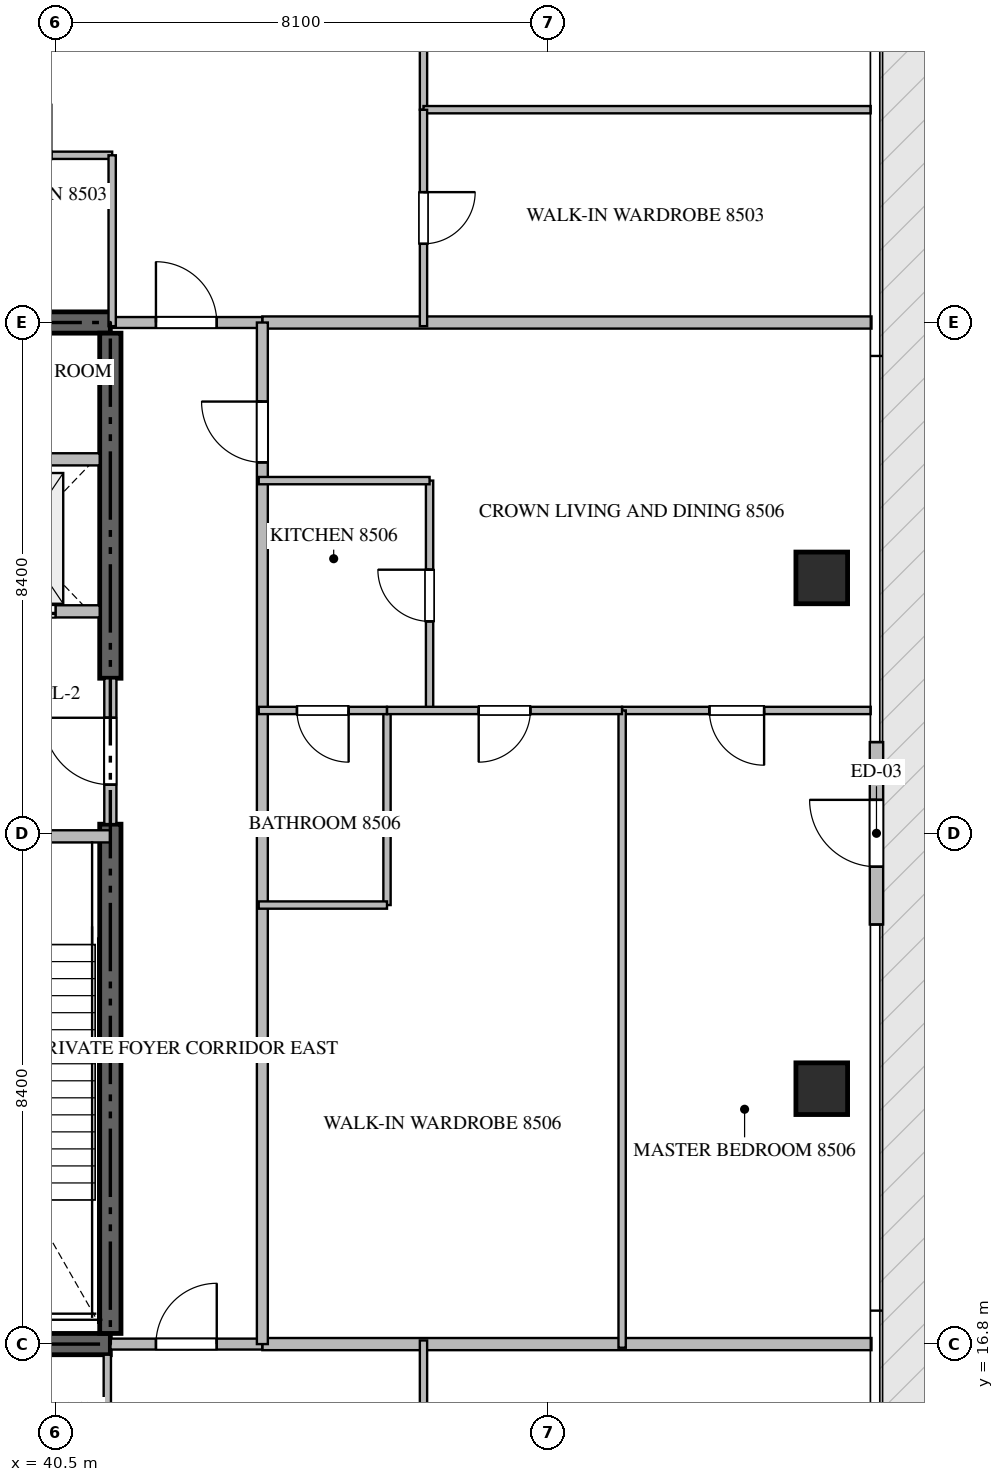
"""IFC4 building model, lengths in metres.
Left out: names, types, materials, properties, quantities, classifications, styles, units other than length and angle.
Written with IfcOpenShell. Run it as: python <this file> out.ifc"""

import sys

from ifc_helpers import new_model, si_unit, direction, frame, frame_2d, origin, origin_2d, place, context, subcontext, project, spatial, rectangle, extrude, source, transform, mapped, element, fill, save


model = new_model("IFC4")
c1 = context("Model", 3, precision=1e-05, world=origin(), true_north=direction((0.0, 1.0)))
c2 = subcontext(c1, "Body", "Model", "MODEL_VIEW")
j1 = project(units=[si_unit("LENGTHUNIT", "METRE"), si_unit("PLANEANGLEUNIT", "RADIAN")], contexts=[c1])
p1 = place(None, origin())
s1 = spatial("IfcSite", under=j1, at=p1, CompositionType="ELEMENT")
p2 = place(p1, origin())
s2 = spatial("IfcBuilding", under=s1, at=p2, CompositionType="ELEMENT")
p3 = place(p2, frame((0.0, 0.0, 342.05)))
s3 = spatial("IfcBuildingStorey", under=s2, at=p3, CompositionType="ELEMENT", Elevation=342.05)
for number, where, z_axis, x_axis in (
    (1, (23.4, 16.8, -0.26), (0.0, 0.0, 1.0), (1.0, 0.0, 0.0)),
    (2, (41.4, 33.6, -0.26), (0.0, 0.0, 1.0), (-1.0, 0.0, 0.0)),
):
    element("IfcWall", number, at=place(p3, frame(where, z_axis=z_axis, x_axis=x_axis)), inside=s3, PredefinedType="SHEAR", context=c2, shape_type="SweptSolid", body=[
        extrude(rectangle(XDim=18.0, YDim=0.35, at=frame_2d((9.0, 0.0))), origin(), (0.0, 0.0, 1.0), 5.898),
    ])
p4 = place(p3, frame((41.4, 16.975, -0.26), z_axis=(0.0, 0.0, 1.0), x_axis=(0.0, 1.0, 0.0)))
e3 = element("IfcWall", 3, at=p4, inside=s3, PredefinedType="SHEAR", context=c2, shape_type="SweptSolid", body=[
    extrude(rectangle(XDim=8.375, YDim=0.35, at=frame_2d((4.188, 0.0))), origin(), (0.0, 0.0, 1.0), 5.898),
])
p5 = place(p3, frame((41.4, 27.75, -0.26), z_axis=(0.0, 0.0, 1.0), x_axis=(0.0, 1.0, 0.0)))
e4 = element("IfcWall", 4, at=p5, inside=s3, PredefinedType="SHEAR", context=c2, shape_type="SweptSolid", body=[
    extrude(rectangle(XDim=5.675, YDim=0.35, at=frame_2d((2.837, 0.0))), origin(), (0.0, 0.0, 1.0), 5.898),
])
m1 = source(origin(), c2, "Body", "SweptSolid", [
    extrude(rectangle(XDim=0.85, YDim=0.85, at=origin_2d()), origin(), (0.0, 0.0, 1.0), 5.9),
])
for number, where, z_axis, x_axis in (
    (5, (53.1, 21.0, -0.26), (0.0, 0.0, 1.0), (1.0, 0.0, 0.0)),
    (6, (53.1, 29.4, -0.26), (0.0, 0.0, 1.0), (1.0, 0.0, 0.0)),
):
    element("IfcColumn", number, at=place(p3, frame(where, z_axis=z_axis, x_axis=x_axis)), inside=s3, PredefinedType="COLUMN", context=c2, shape_type="MappedRepresentation", body=[
        mapped(m1, transform((0.0, 0.0, 0.0), scale=1.0)),
    ])
p6 = place(p3, frame((54.0, 23.7, 0.0), z_axis=(0.0, 0.0, 1.0), x_axis=(0.0, 1.0, 0.0)))
e7 = element("IfcWall", 7, at=p6, inside=s3, PredefinedType="ELEMENTEDWALL", context=c2, shape_type="SweptSolid", body=[
    extrude(rectangle(XDim=3.0, YDim=0.22, at=frame_2d((1.5, 0.0))), origin(), (0.0, 0.0, 1.0), 5.625),
])
p7 = place(p6, frame((0.95, 0.0, 0.0)))
e8 = element("IfcOpeningElement", 8, at=p7, cuts=e7, PredefinedType="OPENING", context=c2, shape_type="SweptSolid", body=[
    extrude(rectangle(XDim=1.1, YDim=2.2, at=frame_2d((0.55, 1.1))), frame((0.0, 0.12, 0.0), z_axis=(0.0, -1.0, 0.0), x_axis=(1.0, 0.0, 0.0)), (0.0, 0.0, 1.0), 0.24),
])
p8 = place(p3, frame((36.95, 25.15, 0.0), z_axis=(0.0, 0.0, 1.0), x_axis=(1.0, 0.0, 0.0)))
e9 = element("IfcWall", 9, at=p8, inside=s3, PredefinedType="STANDARD", context=c2, shape_type="SweptSolid", body=[
    extrude(rectangle(XDim=4.45, YDim=0.2, at=frame_2d((2.225, 0.0))), origin(), (0.0, 0.0, 1.0), 5.64),
])
p9 = place(p8, frame((1.65, 0.0, 0.0)))
e10 = element("IfcOpeningElement", 10, at=p9, cuts=e9, PredefinedType="OPENING", context=c2, shape_type="SweptSolid", body=[
    extrude(rectangle(XDim=1.1, YDim=2.15, at=frame_2d((0.55, 1.075))), frame((0.0, 0.11, 0.0), z_axis=(0.0, -1.0, 0.0), x_axis=(1.0, 0.0, 0.0)), (0.0, 0.0, 1.0), 0.22),
])
p10 = place(p3, frame((38.75, 28.85, 0.0), z_axis=(0.0, 0.0, 1.0), x_axis=(1.0, 0.0, 0.0)))
e11 = element("IfcWall", 11, at=p10, inside=s3, PredefinedType="STANDARD", context=c2, shape_type="SweptSolid", body=[
    extrude(rectangle(XDim=2.475, YDim=0.2, at=frame_2d((1.238, 0.0))), origin(), (0.0, 0.0, 1.0), 5.64),
])
p11 = place(p10, frame((0.55, 0.0, 0.0)))
e12 = element("IfcOpeningElement", 12, at=p11, cuts=e11, PredefinedType="OPENING", context=c2, shape_type="SweptSolid", body=[
    extrude(rectangle(XDim=1.2, YDim=2.2, at=frame_2d((0.6, 1.1))), frame((0.0, 0.11, 0.0), z_axis=(0.0, -1.0, 0.0), x_axis=(1.0, 0.0, 0.0)), (0.0, 0.0, 1.0), 0.22),
])
p12 = place(p3, frame((38.75, 31.35, 0.0), z_axis=(0.0, 0.0, 1.0), x_axis=(1.0, 0.0, 0.0)))
e13 = element("IfcWall", 13, at=p12, inside=s3, PredefinedType="STANDARD", context=c2, shape_type="SweptSolid", body=[
    extrude(rectangle(XDim=2.475, YDim=0.2, at=frame_2d((1.238, 0.0))), origin(), (0.0, 0.0, 1.0), 5.64),
])
p13 = place(p3, frame((41.4, 25.352, 0.0), z_axis=(0.0, 0.0, 1.0), x_axis=(0.0, 1.0, 0.0)))
e14 = element("IfcWall", 14, at=p13, inside=s3, PredefinedType="STANDARD", context=c2, shape_type="SweptSolid", body=[
    extrude(rectangle(XDim=2.396, YDim=0.2, at=frame_2d((1.198, 0.0))), origin(), (0.0, 0.0, 1.0), 5.64),
])
p14 = place(p13, frame((0.648, 0.0, 0.0)))
e15 = element("IfcOpeningElement", 15, at=p14, cuts=e14, PredefinedType="OPENING", context=c2, shape_type="SweptSolid", body=[
    extrude(rectangle(XDim=1.1, YDim=2.15, at=frame_2d((0.55, 1.075))), frame((0.0, 0.11, 0.0), z_axis=(0.0, -1.0, 0.0), x_axis=(1.0, 0.0, 0.0)), (0.0, 0.0, 1.0), 0.22),
])
for number, where, z_axis, x_axis in (
    (16, (43.9, 16.8, 0.0), (0.0, 0.0, 1.0), (1.0, 0.0, 0.0)),
    (17, (43.9, 33.6, 0.0), (0.0, 0.0, 1.0), (1.0, 0.0, 0.0)),
):
    element("IfcWall", number, at=place(p3, frame(where, z_axis=z_axis, x_axis=x_axis)), inside=s3, PredefinedType="PARTITIONING", context=c2, shape_type="SweptSolid", body=[
        extrude(rectangle(XDim=10.018, YDim=0.2, at=frame_2d((5.009, 0.0))), origin(), (0.0, 0.0, 1.0), 5.64),
    ])
p15 = place(p3, frame((41.402, 16.8, 0.0), z_axis=(0.0, 0.0, 1.0), x_axis=(1.0, 0.0, 0.0)))
e18 = element("IfcWall", 18, at=p15, inside=s3, PredefinedType="PARTITIONING", context=c2, shape_type="SweptSolid", body=[
    extrude(rectangle(XDim=2.496, YDim=0.18, at=frame_2d((1.248, 0.0))), origin(), (0.0, 0.0, 1.0), 5.64),
])
p16 = place(p15, frame((0.748, 0.0, 0.0)))
e19 = element("IfcOpeningElement", 19, at=p16, cuts=e18, PredefinedType="OPENING", context=c2, shape_type="SweptSolid", body=[
    extrude(rectangle(XDim=1.0, YDim=2.15, at=frame_2d((0.5, 1.075))), frame((0.0, 0.1, 0.0), z_axis=(0.0, -1.0, 0.0), x_axis=(1.0, 0.0, 0.0)), (0.0, 0.0, 1.0), 0.2),
])
p17 = place(p3, frame((41.402, 33.6, 0.0), z_axis=(0.0, 0.0, 1.0), x_axis=(1.0, 0.0, 0.0)))
e20 = element("IfcWall", 20, at=p17, inside=s3, PredefinedType="PARTITIONING", context=c2, shape_type="SweptSolid", body=[
    extrude(rectangle(XDim=2.496, YDim=0.18, at=frame_2d((1.248, 0.0))), origin(), (0.0, 0.0, 1.0), 5.64),
])
p18 = place(p17, frame((0.748, 0.0, 0.0)))
e21 = element("IfcOpeningElement", 21, at=p18, cuts=e20, PredefinedType="OPENING", context=c2, shape_type="SweptSolid", body=[
    extrude(rectangle(XDim=1.0, YDim=2.15, at=frame_2d((0.5, 1.075))), frame((0.0, 0.1, 0.0), z_axis=(0.0, -1.0, 0.0), x_axis=(1.0, 0.0, 0.0)), (0.0, 0.0, 1.0), 0.2),
])
p19 = place(p3, frame((43.9, 16.8, 0.0), z_axis=(0.0, 0.0, 1.0), x_axis=(0.0, 1.0, 0.0)))
e22 = element("IfcWall", 22, at=p19, inside=s3, PredefinedType="PARTITIONING", context=c2, shape_type="SweptSolid", body=[
    extrude(rectangle(XDim=16.8, YDim=0.18, at=frame_2d((8.4, 0.0))), origin(), (0.0, 0.0, 1.0), 5.64),
])
p20 = place(p19, frame((14.5, 0.0, 0.0)))
e23 = element("IfcOpeningElement", 23, at=p20, cuts=e22, PredefinedType="OPENING", context=c2, shape_type="SweptSolid", body=[
    extrude(rectangle(XDim=1.0, YDim=2.15, at=frame_2d((0.5, 1.075))), frame((0.0, 0.1, 0.0), z_axis=(0.0, -1.0, 0.0), x_axis=(1.0, 0.0, 0.0)), (0.0, 0.0, 1.0), 0.2),
])
p21 = place(p3, frame((41.35, 14.05, 0.0), z_axis=(0.0, 0.0, 1.0), x_axis=(0.0, 1.0, 0.0)))
e24 = element("IfcWall", 24, at=p21, inside=s3, PredefinedType="PARTITIONING", context=c2, shape_type="SweptSolid", body=[
    extrude(rectangle(XDim=2.575, YDim=0.12, at=frame_2d((1.288, 0.0))), origin(), (0.0, 0.0, 1.0), 5.64),
])
p22 = place(p3, frame((46.55, 13.302, 0.0), z_axis=(0.0, 0.0, 1.0), x_axis=(0.0, 1.0, 0.0)))
e25 = element("IfcWall", 25, at=p22, inside=s3, PredefinedType="PARTITIONING", context=c2, shape_type="SweptSolid", body=[
    extrude(rectangle(XDim=3.558, YDim=0.12, at=frame_2d((1.779, 0.0))), origin(), (0.0, 0.0, 1.0), 5.64),
])
p23 = place(p22, frame((1.354, 0.0, 0.0)))
e26 = element("IfcOpeningElement", 26, at=p23, cuts=e25, PredefinedType="OPENING", context=c2, shape_type="SweptSolid", body=[
    extrude(rectangle(XDim=0.85, YDim=2.1, at=frame_2d((0.425, 1.05))), frame((0.0, 0.07, 0.0), z_axis=(0.0, -1.0, 0.0), x_axis=(1.0, 0.0, 0.0)), (0.0, 0.0, 1.0), 0.14),
])
p24 = place(p3, frame((38.58, 36.35, 0.0), z_axis=(0.0, 0.0, 1.0), x_axis=(1.0, 0.0, 0.0)))
e27 = element("IfcWall", 27, at=p24, inside=s3, PredefinedType="PARTITIONING", context=c2, shape_type="SweptSolid", body=[
    extrude(rectangle(XDim=2.85, YDim=0.12, at=frame_2d((1.425, 0.0))), origin(), (0.0, 0.0, 1.0), 5.64),
])
p25 = place(p24, frame((1.0, 0.0, 0.0)))
e28 = element("IfcOpeningElement", 28, at=p25, cuts=e27, PredefinedType="OPENING", context=c2, shape_type="SweptSolid", body=[
    extrude(rectangle(XDim=0.85, YDim=2.1, at=frame_2d((0.425, 1.05))), frame((0.0, 0.07, 0.0), z_axis=(0.0, -1.0, 0.0), x_axis=(1.0, 0.0, 0.0)), (0.0, 0.0, 1.0), 0.14),
])
p26 = place(p3, frame((41.43, 36.35, 0.0), z_axis=(0.0, 0.0, 1.0), x_axis=(0.0, -1.0, 0.0)))
e29 = element("IfcWall", 29, at=p26, inside=s3, PredefinedType="PARTITIONING", context=c2, shape_type="SweptSolid", body=[
    extrude(rectangle(XDim=2.81, YDim=0.12, at=frame_2d((1.405, 0.0))), origin(), (0.0, 0.0, 1.0), 5.64),
])
p27 = place(p3, frame((46.55, 46.305, 0.0), z_axis=(0.0, 0.0, 1.0), x_axis=(0.0, -1.0, 0.0)))
e30 = element("IfcWall", 30, at=p27, inside=s3, PredefinedType="PARTITIONING", context=c2, shape_type="SweptSolid", body=[
    extrude(rectangle(XDim=9.205, YDim=0.12, at=frame_2d((4.603, 0.0))), origin(), (0.0, 0.0, 1.0), 5.64),
])
p28 = place(p27, frame((4.568, 0.0, 0.0)))
e31 = element("IfcOpeningElement", 31, at=p28, cuts=e30, PredefinedType="OPENING", context=c2, shape_type="SweptSolid", body=[
    extrude(rectangle(XDim=0.9, YDim=2.1, at=frame_2d((0.45, 1.05))), frame((0.0, 0.07, 0.0), z_axis=(0.0, -1.0, 0.0), x_axis=(1.0, 0.0, 0.0)), (0.0, 0.0, 1.0), 0.14),
])
p29 = place(p3, frame((46.55, 37.1, 0.0), z_axis=(0.0, 0.0, 1.0), x_axis=(1.0, 0.0, 0.0)))
e32 = element("IfcWall", 32, at=p29, inside=s3, PredefinedType="PARTITIONING", context=c2, shape_type="SweptSolid", body=[
    extrude(rectangle(XDim=7.355, YDim=0.12, at=frame_2d((3.677, 0.0))), origin(), (0.0, 0.0, 1.0), 5.64),
])
p30 = place(p3, frame((46.55, 37.098, 0.0), z_axis=(0.0, 0.0, 1.0), x_axis=(0.0, -1.0, 0.0)))
e33 = element("IfcWall", 33, at=p30, inside=s3, PredefinedType="PARTITIONING", context=c2, shape_type="SweptSolid", body=[
    extrude(rectangle(XDim=3.558, YDim=0.12, at=frame_2d((1.779, 0.0))), origin(), (0.0, 0.0, 1.0), 5.64),
])
p31 = place(p30, frame((1.354, 0.0, 0.0)))
e34 = element("IfcOpeningElement", 34, at=p31, cuts=e33, PredefinedType="OPENING", context=c2, shape_type="SweptSolid", body=[
    extrude(rectangle(XDim=0.85, YDim=2.1, at=frame_2d((0.425, 1.05))), frame((0.0, 0.07, 0.0), z_axis=(0.0, -1.0, 0.0), x_axis=(1.0, 0.0, 0.0)), (0.0, 0.0, 1.0), 0.14),
])
p32 = place(p3, frame((46.65, 27.22, 0.0), z_axis=(0.0, 0.0, 1.0), x_axis=(0.0, 1.0, 0.0)))
e35 = element("IfcWall", 35, at=p32, inside=s3, PredefinedType="PARTITIONING", context=c2, shape_type="SweptSolid", body=[
    extrude(rectangle(XDim=3.78, YDim=0.12, at=frame_2d((1.89, 0.0))), origin(), (0.0, 0.0, 1.0), 5.64),
])
p33 = place(p32, frame((1.465, 0.0, 0.0)))
e36 = element("IfcOpeningElement", 36, at=p33, cuts=e35, PredefinedType="OPENING", context=c2, shape_type="SweptSolid", body=[
    extrude(rectangle(XDim=0.85, YDim=2.1, at=frame_2d((0.425, 1.05))), frame((0.0, 0.07, 0.0), z_axis=(0.0, -1.0, 0.0), x_axis=(1.0, 0.0, 0.0)), (0.0, 0.0, 1.0), 0.14),
])
p34 = place(p3, frame((46.65, 31.0, 0.0), z_axis=(0.0, 0.0, 1.0), x_axis=(-1.0, 0.0, 0.0)))
e37 = element("IfcWall", 37, at=p34, inside=s3, PredefinedType="PARTITIONING", context=c2, shape_type="SweptSolid", body=[
    extrude(rectangle(XDim=2.81, YDim=0.12, at=frame_2d((1.405, 0.0))), origin(), (0.0, 0.0, 1.0), 5.64),
])
p35 = place(p3, frame((53.905, 27.22, 0.0), z_axis=(0.0, 0.0, 1.0), x_axis=(-1.0, 0.0, 0.0)))
e38 = element("IfcWall", 38, at=p35, inside=s3, PredefinedType="PARTITIONING", context=c2, shape_type="SweptSolid", body=[
    extrude(rectangle(XDim=4.088, YDim=0.12, at=frame_2d((2.044, 0.0))), origin(), (0.0, 0.0, 1.0), 5.64),
])
p36 = place(p35, frame((1.753, 0.0, 0.0)))
e39 = element("IfcOpeningElement", 39, at=p36, cuts=e38, PredefinedType="OPENING", context=c2, shape_type="SweptSolid", body=[
    extrude(rectangle(XDim=0.9, YDim=2.1, at=frame_2d((0.45, 1.05))), frame((0.0, 0.07, 0.0), z_axis=(0.0, -1.0, 0.0), x_axis=(1.0, 0.0, 0.0)), (0.0, 0.0, 1.0), 0.14),
])
p37 = place(p3, frame((49.817, 16.74, 0.0), z_axis=(0.0, 0.0, 1.0), x_axis=(0.0, 1.0, 0.0)))
e40 = element("IfcWall", 40, at=p37, inside=s3, PredefinedType="PARTITIONING", context=c2, shape_type="SweptSolid", body=[
    extrude(rectangle(XDim=10.48, YDim=0.12, at=frame_2d((5.24, 0.0))), origin(), (0.0, 0.0, 1.0), 5.64),
])
p38 = place(p3, frame((45.95, 24.02, 0.0), z_axis=(0.0, 0.0, 1.0), x_axis=(0.0, 1.0, 0.0)))
e41 = element("IfcWall", 41, at=p38, inside=s3, PredefinedType="PARTITIONING", context=c2, shape_type="SweptSolid", body=[
    extrude(rectangle(XDim=3.2, YDim=0.12, at=frame_2d((1.6, 0.0))), origin(), (0.0, 0.0, 1.0), 5.64),
])
p39 = place(p3, frame((45.95, 24.02, 0.0), z_axis=(0.0, 0.0, 1.0), x_axis=(-1.0, 0.0, 0.0)))
e42 = element("IfcWall", 42, at=p39, inside=s3, PredefinedType="PARTITIONING", context=c2, shape_type="SweptSolid", body=[
    extrude(rectangle(XDim=2.11, YDim=0.12, at=frame_2d((1.055, 0.0))), origin(), (0.0, 0.0, 1.0), 5.64),
])
p40 = place(p3, frame((49.815, 27.22, 0.0), z_axis=(0.0, 0.0, 1.0), x_axis=(-1.0, 0.0, 0.0)))
e43 = element("IfcWall", 43, at=p40, inside=s3, PredefinedType="PARTITIONING", context=c2, shape_type="SweptSolid", body=[
    extrude(rectangle(XDim=3.865, YDim=0.12, at=frame_2d((1.933, 0.0))), origin(), (0.0, 0.0, 1.0), 5.64),
])
p41 = place(p40, frame((1.507, 0.0, 0.0)))
e44 = element("IfcOpeningElement", 44, at=p41, cuts=e43, PredefinedType="OPENING", context=c2, shape_type="SweptSolid", body=[
    extrude(rectangle(XDim=0.85, YDim=2.1, at=frame_2d((0.425, 1.05))), frame((0.0, 0.07, 0.0), z_axis=(0.0, -1.0, 0.0), x_axis=(1.0, 0.0, 0.0)), (0.0, 0.0, 1.0), 0.14),
])
p42 = place(p3, frame((45.948, 27.22, 0.0), z_axis=(0.0, 0.0, 1.0), x_axis=(-1.0, 0.0, 0.0)))
e45 = element("IfcWall", 45, at=p42, inside=s3, PredefinedType="PARTITIONING", context=c2, shape_type="SweptSolid", body=[
    extrude(rectangle(XDim=2.108, YDim=0.12, at=frame_2d((1.054, 0.0))), origin(), (0.0, 0.0, 1.0), 5.64),
])
p43 = place(p42, frame((0.629, 0.0, 0.0)))
e46 = element("IfcOpeningElement", 46, at=p43, cuts=e45, PredefinedType="OPENING", context=c2, shape_type="SweptSolid", body=[
    extrude(rectangle(XDim=0.85, YDim=2.1, at=frame_2d((0.425, 1.05))), frame((0.0, 0.07, 0.0), z_axis=(0.0, -1.0, 0.0), x_axis=(1.0, 0.0, 0.0)), (0.0, 0.0, 1.0), 0.14),
])
m2 = source(origin(), c2, "Body", "SweptSolid", [
    extrude(rectangle(XDim=1.1, YDim=2.2, at=frame_2d((0.55, 1.1))), frame((0.0, 0.025, 0.0), z_axis=(0.0, -1.0, 0.0), x_axis=(1.0, 0.0, 0.0)), (0.0, 0.0, 1.0), 0.05),
])
p44 = place(p7, origin())
e47 = element("IfcDoor", 47, at=p44, inside=s3, OperationType="SINGLE_SWING_RIGHT", PredefinedType="DOOR", context=c2, shape_type="MappedRepresentation", body=[
    mapped(m2, transform((0.0, 0.0, 0.0), scale=1.0)),
])
fill(e8, e47)
m3 = source(origin(), c2, "Body", "SweptSolid", [
    extrude(rectangle(XDim=1.2, YDim=2.2, at=frame_2d((0.6, 1.1))), frame((0.0, 0.025, 0.0), z_axis=(0.0, -1.0, 0.0), x_axis=(1.0, 0.0, 0.0)), (0.0, 0.0, 1.0), 0.05),
])
p45 = place(p11, origin())
e48 = element("IfcDoor", 48, at=p45, inside=s3, OperationType="DOUBLE_DOOR_SLIDING", PredefinedType="DOOR", context=c2, shape_type="MappedRepresentation", body=[
    mapped(m3, transform((0.0, 0.0, 0.0), scale=1.0)),
])
fill(e12, e48)
m4 = source(origin(), c2, "Body", "SweptSolid", [
    extrude(rectangle(XDim=1.1, YDim=2.15, at=frame_2d((0.55, 1.075))), frame((0.0, 0.025, 0.0), z_axis=(0.0, -1.0, 0.0), x_axis=(1.0, 0.0, 0.0)), (0.0, 0.0, 1.0), 0.05),
])
p46 = place(p14, origin())
e49 = element("IfcDoor", 49, at=p46, inside=s3, OperationType="SINGLE_SWING_RIGHT", PredefinedType="DOOR", context=c2, shape_type="MappedRepresentation", body=[
    mapped(m4, transform((0.0, 0.0, 0.0), scale=1.0)),
])
fill(e15, e49)
m5 = source(origin(), c2, "Body", "SweptSolid", [
    extrude(rectangle(XDim=1.0, YDim=2.15, at=frame_2d((0.5, 1.075))), frame((0.0, 0.025, 0.0), z_axis=(0.0, -1.0, 0.0), x_axis=(1.0, 0.0, 0.0)), (0.0, 0.0, 1.0), 0.05),
])
p47 = place(p16, origin())
e50 = element("IfcDoor", 50, at=p47, inside=s3, OperationType="SINGLE_SWING_RIGHT", PredefinedType="DOOR", context=c2, shape_type="MappedRepresentation", body=[
    mapped(m5, transform((0.0, 0.0, 0.0), scale=1.0)),
])
fill(e19, e50)
p48 = place(p18, origin())
e51 = element("IfcDoor", 51, at=p48, inside=s3, OperationType="SINGLE_SWING_LEFT", PredefinedType="DOOR", context=c2, shape_type="MappedRepresentation", body=[
    mapped(m5, transform((0.0, 0.0, 0.0), scale=1.0)),
])
fill(e21, e51)
p49 = place(p20, origin())
e52 = element("IfcDoor", 52, at=p49, inside=s3, OperationType="SINGLE_SWING_RIGHT", PredefinedType="DOOR", context=c2, shape_type="MappedRepresentation", body=[
    mapped(m5, transform((0.0, 0.0, 0.0), scale=1.0)),
])
fill(e23, e52)
m6 = source(origin(), c2, "Body", "SweptSolid", [
    extrude(rectangle(XDim=0.85, YDim=2.1, at=frame_2d((0.425, 1.05))), frame((0.0, 0.025, 0.0), z_axis=(0.0, -1.0, 0.0), x_axis=(1.0, 0.0, 0.0)), (0.0, 0.0, 1.0), 0.05),
])
p50 = place(p31, origin())
e53 = element("IfcDoor", 53, at=p50, inside=s3, OperationType="SINGLE_SWING_LEFT", PredefinedType="DOOR", context=c2, shape_type="MappedRepresentation", body=[
    mapped(m6, transform((0.0, 0.0, 0.0), scale=1.0)),
])
fill(e34, e53)
p51 = place(p33, origin())
e54 = element("IfcDoor", 54, at=p51, inside=s3, OperationType="SINGLE_SWING_RIGHT", PredefinedType="DOOR", context=c2, shape_type="MappedRepresentation", body=[
    mapped(m6, transform((0.0, 0.0, 0.0), scale=1.0)),
])
fill(e36, e54)
m7 = source(origin(), c2, "Body", "SweptSolid", [
    extrude(rectangle(XDim=0.9, YDim=2.1, at=frame_2d((0.45, 1.05))), frame((0.0, 0.025, 0.0), z_axis=(0.0, -1.0, 0.0), x_axis=(1.0, 0.0, 0.0)), (0.0, 0.0, 1.0), 0.05),
])
p52 = place(p36, origin())
e55 = element("IfcDoor", 55, at=p52, inside=s3, OperationType="SINGLE_SWING_LEFT", PredefinedType="DOOR", context=c2, shape_type="MappedRepresentation", body=[
    mapped(m7, transform((0.0, 0.0, 0.0), scale=1.0)),
])
fill(e39, e55)
p53 = place(p41, origin())
e56 = element("IfcDoor", 56, at=p53, inside=s3, OperationType="SINGLE_SWING_RIGHT", PredefinedType="DOOR", context=c2, shape_type="MappedRepresentation", body=[
    mapped(m6, transform((0.0, 0.0, 0.0), scale=1.0)),
])
fill(e44, e56)
p54 = place(p43, origin())
e57 = element("IfcDoor", 57, at=p54, inside=s3, OperationType="SINGLE_SWING_LEFT", PredefinedType="DOOR", context=c2, shape_type="MappedRepresentation", body=[
    mapped(m6, transform((0.0, 0.0, 0.0), scale=1.0)),
])
fill(e46, e57)
save(model, sys.argv[1])
